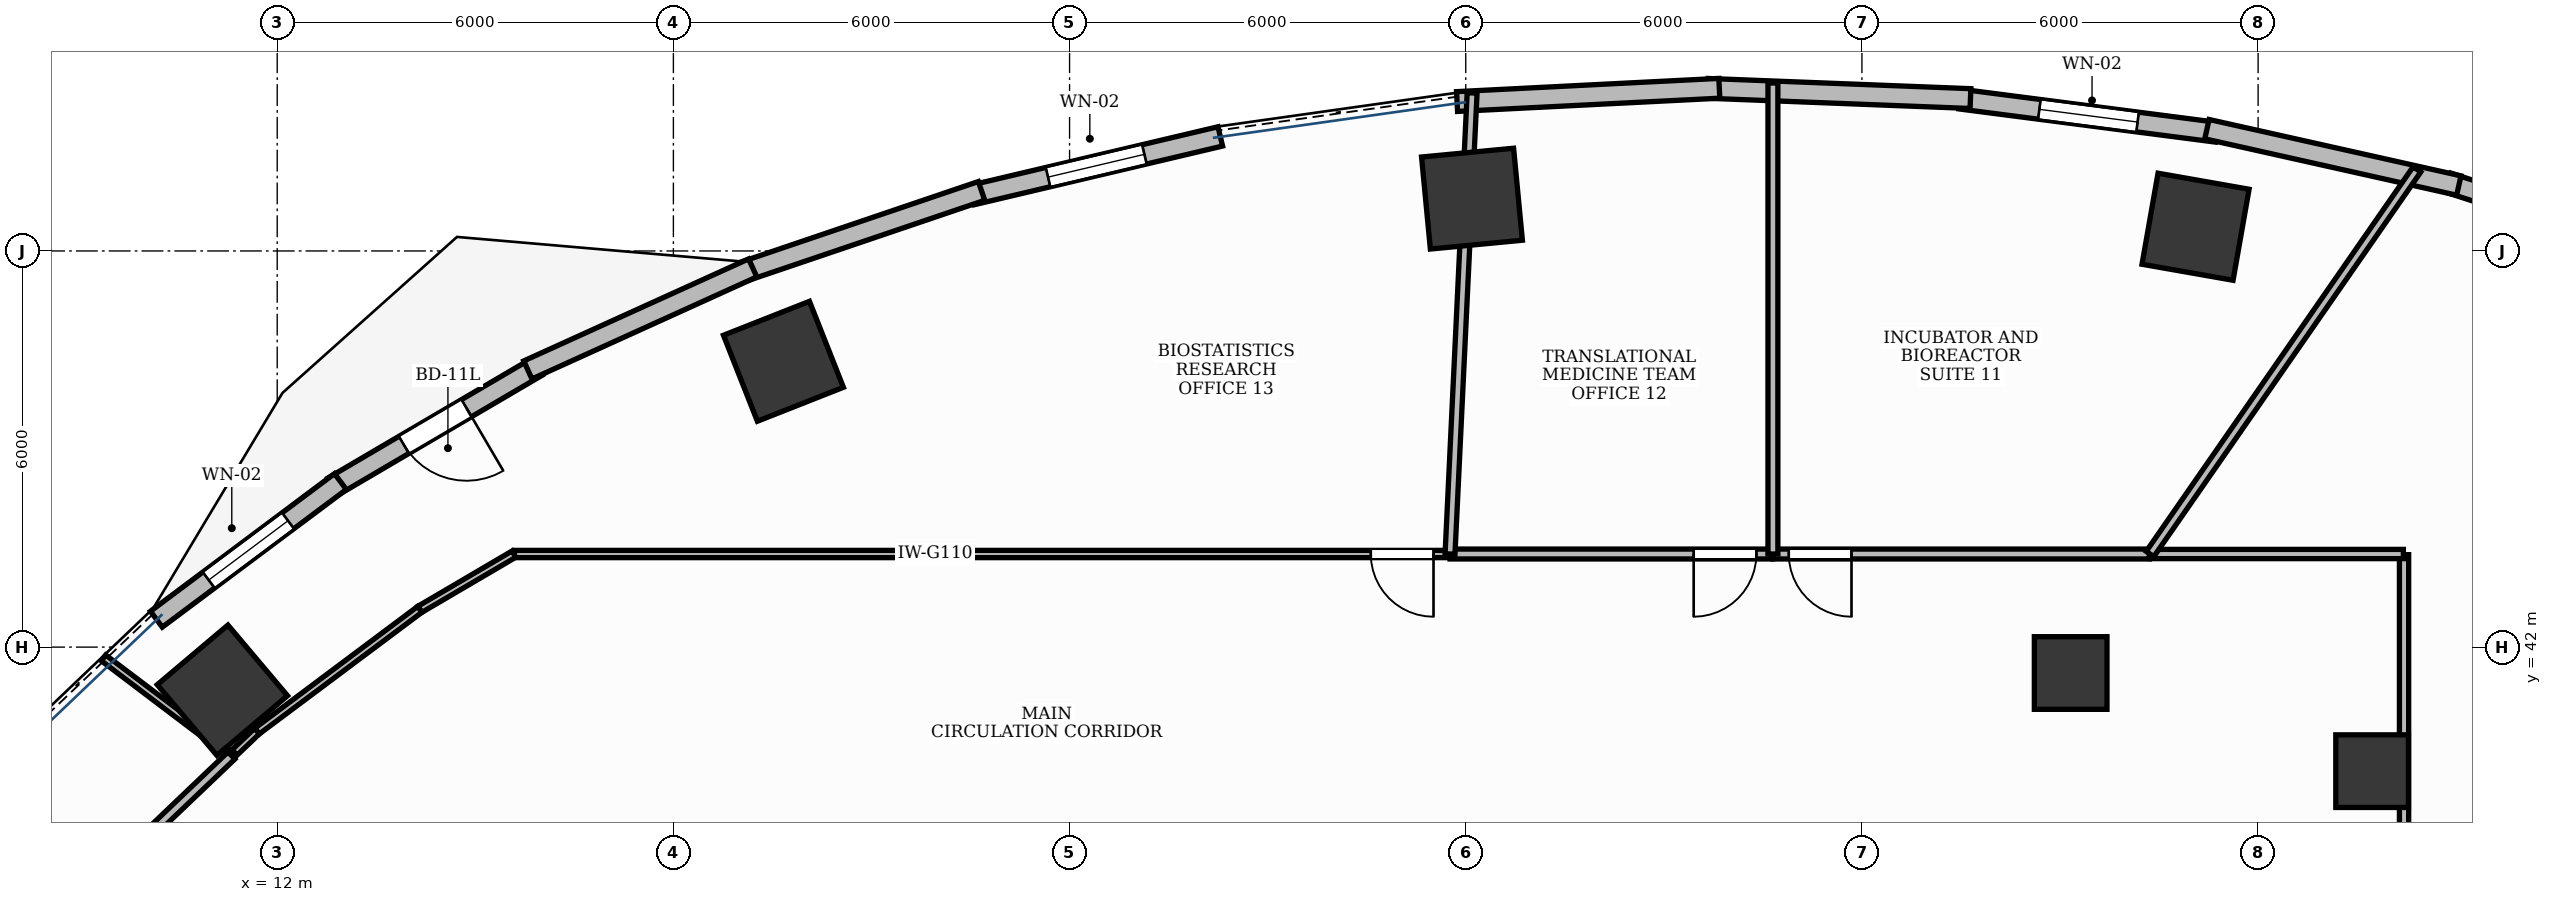
"""IFC4 building model, lengths in metres.
Left out: names, types, materials, properties, quantities, classifications, styles, units other than length and angle.
Written with IfcOpenShell. Run it as: python <this file> out.ifc"""

import sys

from ifc_helpers import new_model, si_unit, direction, frame, frame_2d, origin, origin_2d, place, context, subcontext, project, spatial, rectangle, extrude, element, fill, save


model = new_model("IFC4")
c1 = context("Model", 3, precision=1e-05, world=origin(), true_north=direction((0.0, 1.0)))
c2 = subcontext(c1, "Body", "Model", "MODEL_VIEW")
j1 = project(units=[si_unit("LENGTHUNIT", "METRE"), si_unit("PLANEANGLEUNIT", "RADIAN")], contexts=[c1])
p1 = place(None, origin())
s1 = spatial("IfcSite", under=j1, at=p1, CompositionType="ELEMENT")
p2 = place(p1, origin())
s2 = spatial("IfcBuilding", under=s1, at=p2, CompositionType="ELEMENT")
p3 = place(p2, frame((0.0, 0.0, 38.4)))
s3 = spatial("IfcBuildingStorey", under=s2, at=p3, CompositionType="ELEMENT", Elevation=38.4)
p4 = place(p3, frame((43.727, 40.121, -0.0), z_axis=(0.0, 0.0, 1.0), x_axis=(1.0, 0.0, 0.0)))
e1 = element("IfcColumn", 1, at=p4, inside=s3, PredefinedType="COLUMN", context=c2, shape_type="SweptSolid", body=[
    extrude(rectangle(XDim=1.1, YDim=1.1, at=origin_2d()), origin(), (0.0, 0.0, 1.0), 3.901),
])
p5 = place(p3, frame((41.052, 48.367, -0.0), z_axis=(0.0, 0.0, 1.0), x_axis=(-0.984868307662, 0.173304404339, 0.0)))
e2 = element("IfcColumn", 2, at=p5, inside=s3, PredefinedType="COLUMN", context=c2, shape_type="SweptSolid", body=[
    extrude(rectangle(XDim=1.4, YDim=1.4, at=origin_2d()), origin(), (0.0, 0.0, 1.0), 3.901),
])
p6 = place(p3, frame((39.161, 41.608, -0.0), z_axis=(0.0, 0.0, 1.0), x_axis=(1.0, 0.0, 0.0)))
e3 = element("IfcColumn", 3, at=p6, inside=s3, PredefinedType="COLUMN", context=c2, shape_type="SweptSolid", body=[
    extrude(rectangle(XDim=1.1, YDim=1.1, at=origin_2d()), origin(), (0.0, 0.0, 1.0), 3.901),
])
for number, where, z_axis, x_axis in (
    (4, (30.094, 48.792, -0.0), (0.0, 0.0, 1.0), (0.995, 0.095, 0.0)),
    (5, (19.667, 46.329, -0.0), (0.0, 0.0, 1.0), (0.93, 0.367, 0.0)),
    (6, (11.17, 41.347, -0.0), (0.0, 0.0, 1.0), (0.764, 0.645, 0.0)),
):
    element("IfcColumn", number, at=place(p3, frame(where, z_axis=z_axis, x_axis=x_axis)), inside=s3, PredefinedType="COLUMN", context=c2, shape_type="SweptSolid", body=[
        extrude(rectangle(XDim=1.4, YDim=1.4, at=origin_2d()), origin(), (0.0, 0.0, 1.0), 3.901),
    ])
p7 = place(p3, frame((41.373, 49.798, 0.0), z_axis=(0.0, 0.0, 1.0), x_axis=(-0.991741322416, 0.128254237408, 0.0)))
e7 = element("IfcWall", 7, at=p7, inside=s3, PredefinedType="STANDARD", context=c2, shape_type="SweptSolid", body=[
    extrude(rectangle(XDim=3.916, YDim=0.3, at=frame_2d((1.958, 0.0))), origin(), (0.0, 0.0, 1.0), 3.47),
])
p8 = place(p7, frame((1.208, 0.0, 0.95)))
e8 = element("IfcOpeningElement", 8, at=p8, cuts=e7, PredefinedType="OPENING", context=c2, shape_type="SweptSolid", body=[
    extrude(rectangle(XDim=1.5, YDim=1.8, at=frame_2d((0.75, 0.9))), frame((0.0, 0.165, 0.0), z_axis=(0.0, -1.0, 0.0), x_axis=(1.0, 0.0, 0.0)), (0.0, 0.0, 1.0), 0.33),
])
p9 = place(p3, frame((26.282, 49.735, 0.0), z_axis=(0.0, 0.0, 1.0), x_axis=(-0.973186156802, -0.230018921417, 0.0)))
e9 = element("IfcWall", 9, at=p9, inside=s3, PredefinedType="STANDARD", context=c2, shape_type="SweptSolid", body=[
    extrude(rectangle(XDim=3.861, YDim=0.3, at=frame_2d((1.931, 0.0))), origin(), (0.0, 0.0, 1.0), 3.9),
])
p10 = place(p9, frame((1.181, 0.0, 0.95)))
e10 = element("IfcOpeningElement", 10, at=p10, cuts=e9, PredefinedType="OPENING", context=c2, shape_type="SweptSolid", body=[
    extrude(rectangle(XDim=1.5, YDim=1.8, at=frame_2d((0.75, 0.9))), frame((0.0, 0.165, 0.0), z_axis=(0.0, -1.0, 0.0), x_axis=(1.0, 0.0, 0.0)), (0.0, 0.0, 1.0), 0.33),
])
p11 = place(p3, frame((15.944, 46.25, 0.0), z_axis=(0.0, 0.0, 1.0), x_axis=(-0.862473134325, -0.506102847817, 0.0)))
e11 = element("IfcWall", 11, at=p11, inside=s3, PredefinedType="STANDARD", context=c2, shape_type="SweptSolid", body=[
    extrude(rectangle(XDim=3.595, YDim=0.3, at=frame_2d((1.798, 0.0))), origin(), (0.0, 0.0, 1.0), 3.9),
])
p12 = place(p11, frame((1.248, 0.0, 0.0)))
e12 = element("IfcOpeningElement", 12, at=p12, cuts=e11, PredefinedType="OPENING", context=c2, shape_type="SweptSolid", body=[
    extrude(rectangle(XDim=1.1, YDim=2.15, at=frame_2d((0.55, 1.075))), frame((0.0, 0.165, 0.0), z_axis=(0.0, -1.0, 0.0), x_axis=(1.0, 0.0, 0.0)), (0.0, 0.0, 1.0), 0.33),
])
p13 = place(p3, frame((12.957, 44.507, 0.0), z_axis=(0.0, 0.0, 1.0), x_axis=(-0.800798896088, -0.59893332519, 0.0)))
e13 = element("IfcWall", 13, at=p13, inside=s3, PredefinedType="STANDARD", context=c2, shape_type="SweptSolid", body=[
    extrude(rectangle(XDim=3.481, YDim=0.3, at=frame_2d((1.74, 0.0))), origin(), (0.0, 0.0, 1.0), 3.9),
])
p14 = place(p13, frame((0.99, 0.0, 0.95)))
e14 = element("IfcOpeningElement", 14, at=p14, cuts=e13, PredefinedType="OPENING", context=c2, shape_type="SweptSolid", body=[
    extrude(rectangle(XDim=1.5, YDim=1.8, at=frame_2d((0.75, 0.9))), frame((0.0, 0.165, 0.0), z_axis=(0.0, -1.0, 0.0), x_axis=(1.0, 0.0, 0.0)), (0.0, 0.0, 1.0), 0.33),
])
p15 = place(p3, frame((48.525, 47.849, 0.0), z_axis=(0.0, 0.0, 1.0), x_axis=(-0.950965833732, 0.309295947393, 0.0)))
e15 = element("IfcWall", 15, at=p15, inside=s3, PredefinedType="STANDARD", context=c2, shape_type="SweptSolid", body=[
    extrude(rectangle(XDim=3.84, YDim=0.3, at=frame_2d((1.92, 0.0))), origin(), (0.0, 0.0, 1.0), 3.9),
])
p16 = place(p3, frame((45.04, 48.991, 0.0), z_axis=(0.0, 0.0, 1.0), x_axis=(-0.975868573345, 0.218358713032, 0.0)))
e16 = element("IfcWall", 16, at=p16, inside=s3, PredefinedType="STANDARD", context=c2, shape_type="SweptSolid", body=[
    extrude(rectangle(XDim=3.909, YDim=0.3, at=frame_2d((1.954, 0.0))), origin(), (0.0, 0.0, 1.0), 3.9),
])
p17 = place(p3, frame((37.644, 50.308, 0.0), z_axis=(0.0, 0.0, 1.0), x_axis=(-0.999245411623, 0.038840794937, 0.0)))
e17 = element("IfcWall", 17, at=p17, inside=s3, PredefinedType="STANDARD", context=c2, shape_type="SweptSolid", body=[
    extrude(rectangle(XDim=3.979, YDim=0.3, at=frame_2d((1.989, 0.0))), origin(), (0.0, 0.0, 1.0), 3.9),
])
p18 = place(p3, frame((33.84, 50.463, 0.0), z_axis=(0.0, 0.0, 1.0), x_axis=(-0.998732359232, -0.050335619826, 0.0)))
e18 = element("IfcWall", 18, at=p18, inside=s3, PredefinedType="STANDARD", context=c2, shape_type="SweptSolid", body=[
    extrude(rectangle(XDim=3.977, YDim=0.3, at=frame_2d((1.989, 0.0))), origin(), (0.0, 0.0, 1.0), 3.47),
])
p19 = place(p3, frame((22.667, 48.909, 0.0), z_axis=(0.0, 0.0, 1.0), x_axis=(-0.94702579403, -0.321157508773, 0.0)))
e19 = element("IfcWall", 19, at=p19, inside=s3, PredefinedType="STANDARD", context=c2, shape_type="SweptSolid", body=[
    extrude(rectangle(XDim=3.83, YDim=0.3, at=frame_2d((1.915, 0.0))), origin(), (0.0, 0.0, 1.0), 3.9),
])
p20 = place(p3, frame((19.201, 47.743, 0.0), z_axis=(0.0, 0.0, 1.0), x_axis=(-0.910623406862, -0.413237233166, 0.0)))
e20 = element("IfcWall", 20, at=p20, inside=s3, PredefinedType="STANDARD", context=c2, shape_type="SweptSolid", body=[
    extrude(rectangle(XDim=3.74, YDim=0.3, at=frame_2d((1.87, 0.0))), origin(), (0.0, 0.0, 1.0), 3.9),
])
p21 = place(p3, frame((44.21, 29.72, 0.0), z_axis=(0.0, 0.0, 1.0), x_axis=(0.0, 1.0, 0.0)))
e21 = element("IfcWall", 21, at=p21, inside=s3, PredefinedType="PARTITIONING", context=c2, shape_type="SweptSolid", body=[
    extrude(rectangle(XDim=13.68, YDim=0.14, at=frame_2d((6.84, 0.0))), origin(), (0.0, 0.0, 1.0), 2.91),
])
p22 = place(p21, frame((2.202, 0.0, 0.0)))
e22 = element("IfcOpeningElement", 22, at=p22, cuts=e21, PredefinedType="OPENING", context=c2, shape_type="SweptSolid", body=[
    extrude(rectangle(XDim=0.95, YDim=2.15, at=frame_2d((0.475, 1.075))), frame((0.0, 0.085, 0.0), z_axis=(0.0, -1.0, 0.0), x_axis=(1.0, 0.0, 0.0)), (0.0, 0.0, 1.0), 0.17),
])
p23 = place(p3, frame((40.353, 43.41, 0.0), z_axis=(0.0, 0.0, 1.0), x_axis=(-1.0, 0.0, 0.0)))
e23 = element("IfcWall", 23, at=p23, inside=s3, PredefinedType="PARTITIONING", context=c2, shape_type="SweptSolid", body=[
    extrude(rectangle(XDim=5.701, YDim=0.15, at=frame_2d((2.851, 0.0))), origin(), (0.0, 0.0, 1.0), 2.91),
])
p24 = place(p23, frame((4.511, 0.0, 0.0)))
e24 = element("IfcOpeningElement", 24, at=p24, cuts=e23, PredefinedType="OPENING", context=c2, shape_type="SweptSolid", body=[
    extrude(rectangle(XDim=0.95, YDim=2.15, at=frame_2d((0.475, 1.075))), frame((0.0, 0.09, 0.0), z_axis=(0.0, -1.0, 0.0), x_axis=(1.0, 0.0, 0.0)), (0.0, 0.0, 1.0), 0.18),
])
p25 = place(p3, frame((34.642, 43.41, 0.0), z_axis=(0.0, 0.0, 1.0), x_axis=(-1.0, 0.0, 0.0)))
e25 = element("IfcWall", 25, at=p25, inside=s3, PredefinedType="PARTITIONING", context=c2, shape_type="SweptSolid", body=[
    extrude(rectangle(XDim=4.88, YDim=0.15, at=frame_2d((2.44, 0.0))), origin(), (0.0, 0.0, 1.0), 2.91),
])
p26 = place(p25, frame((0.24, 0.0, 0.0)))
e26 = element("IfcOpeningElement", 26, at=p26, cuts=e25, PredefinedType="OPENING", context=c2, shape_type="SweptSolid", body=[
    extrude(rectangle(XDim=0.95, YDim=2.15, at=frame_2d((0.475, 1.075))), frame((0.0, 0.09, 0.0), z_axis=(0.0, -1.0, 0.0), x_axis=(1.0, 0.0, 0.0)), (0.0, 0.0, 1.0), 0.18),
])
p27 = place(p3, frame((29.752, 43.41, 0.0), z_axis=(0.0, 0.0, 1.0), x_axis=(-1.0, 0.0, 0.0)))
e27 = element("IfcWall", 27, at=p27, inside=s3, PredefinedType="MOVABLE", context=c2, shape_type="SweptSolid", body=[
    extrude(rectangle(XDim=14.161, YDim=0.11, at=frame_2d((7.081, 0.0))), origin(), (0.0, 0.0, 1.0), 2.91),
])
p28 = place(p27, frame((0.24, 0.0, 0.0)))
e28 = element("IfcOpeningElement", 28, at=p28, cuts=e27, PredefinedType="OPENING", context=c2, shape_type="SweptSolid", body=[
    extrude(rectangle(XDim=0.95, YDim=2.15, at=frame_2d((0.475, 1.075))), frame((0.0, 0.07, 0.0), z_axis=(0.0, -1.0, 0.0), x_axis=(1.0, 0.0, 0.0)), (0.0, 0.0, 1.0), 0.14),
])
p29 = place(p3, frame((44.2, 43.41, 0.0), z_axis=(0.0, 0.0, 1.0), x_axis=(-1.0, 0.0, 0.0)))
e29 = element("IfcWall", 29, at=p29, inside=s3, PredefinedType="PARTITIONING", context=c2, shape_type="SweptSolid", body=[
    extrude(rectangle(XDim=3.837, YDim=0.14, at=frame_2d((1.918, 0.0))), origin(), (0.0, 0.0, 1.0), 2.91),
])
p30 = place(p3, frame((40.363, 43.41, 0.0), z_axis=(0.0, 0.0, 1.0), x_axis=(0.570097674314, 0.821576923813, 0.0)))
e30 = element("IfcWall", 30, at=p30, inside=s3, PredefinedType="PARTITIONING", context=c2, shape_type="SweptSolid", body=[
    extrude(rectangle(XDim=7.091, YDim=0.14, at=frame_2d((3.545, 0.0))), origin(), (0.0, 0.0, 1.0), 2.91),
])
p31 = place(p3, frame((34.652, 43.41, 0.0), z_axis=(0.0, 0.0, 1.0), x_axis=(0.0, 1.0, 0.0)))
e31 = element("IfcWall", 31, at=p31, inside=s3, PredefinedType="PARTITIONING", context=c2, shape_type="SweptSolid", body=[
    extrude(rectangle(XDim=7.134, YDim=0.15, at=frame_2d((3.567, 0.0))), origin(), (0.0, 0.0, 1.0), 2.91),
])
p32 = place(p3, frame((29.762, 43.41, 0.0), z_axis=(0.0, 0.0, 1.0), x_axis=(0.047838889666, 0.99885506488, 0.0)))
e32 = element("IfcWall", 32, at=p32, inside=s3, PredefinedType="PARTITIONING", context=c2, shape_type="SweptSolid", body=[
    extrude(rectangle(XDim=6.992, YDim=0.15, at=frame_2d((3.496, 0.0))), origin(), (0.0, 0.0, 1.0), 2.91),
])
p33 = place(p3, frame((15.586, 43.409, 0.0), z_axis=(0.0, 0.0, 1.0), x_axis=(-0.862446636904, -0.506148000582, 0.0)))
e33 = element("IfcWall", 33, at=p33, inside=s3, PredefinedType="MOVABLE", context=c2, shape_type="SweptSolid", body=[
    extrude(rectangle(XDim=1.652, YDim=0.11, at=frame_2d((0.826, 0.0))), origin(), (0.0, 0.0, 1.0), 2.91),
])
p34 = place(p3, frame((14.16, 42.572, 0.0), z_axis=(0.0, 0.0, 1.0), x_axis=(-0.800808090092, -0.598921032227, 0.0)))
e34 = element("IfcWall", 34, at=p34, inside=s3, PredefinedType="MOVABLE", context=c2, shape_type="SweptSolid", body=[
    extrude(rectangle(XDim=3.079, YDim=0.11, at=frame_2d((1.54, 0.0))), origin(), (0.0, 0.0, 1.0), 2.91),
])
p35 = place(p3, frame((11.693, 40.727, 0.0), z_axis=(0.0, 0.0, 1.0), x_axis=(-0.72367263626, -0.690143402148, 0.0)))
e35 = element("IfcWall", 35, at=p35, inside=s3, PredefinedType="MOVABLE", context=c2, shape_type="SweptSolid", body=[
    extrude(rectangle(XDim=0.524, YDim=0.11, at=frame_2d((0.262, 0.0))), origin(), (0.0, 0.0, 1.0), 2.91),
])
p36 = place(p3, frame((11.314, 40.365, 0.0), z_axis=(0.0, 0.0, 1.0), x_axis=(-0.797445450475, 0.603391045274, 0.0)))
e36 = element("IfcWall", 36, at=p36, inside=s3, PredefinedType="MOVABLE", context=c2, shape_type="SweptSolid", body=[
    extrude(rectangle(XDim=2.438, YDim=0.11, at=frame_2d((1.219, 0.0))), origin(), (0.0, 0.0, 1.0), 2.91),
])
p37 = place(p3, frame((11.307, 40.358, 0.0), z_axis=(0.0, 0.0, 1.0), x_axis=(-0.723655021688, -0.690161872017, 0.0)))
e37 = element("IfcWall", 37, at=p37, inside=s3, PredefinedType="PARTITIONING", context=c2, shape_type="SweptSolid", body=[
    extrude(rectangle(XDim=2.406, YDim=0.15, at=frame_2d((1.203, 0.0))), origin(), (0.0, 0.0, 1.0), 2.91),
])
p38 = place(p8, origin())
e38 = element("IfcWindow", 38, at=p38, inside=s3, PartitioningType="DOUBLE_PANEL_VERTICAL", PredefinedType="WINDOW", context=c2, shape_type="SweptSolid", body=[
    extrude(rectangle(XDim=1.5, YDim=1.8, at=frame_2d((0.75, 0.9))), frame((0.0, 0.03, 0.0), z_axis=(0.0, -1.0, 0.0), x_axis=(1.0, 0.0, 0.0)), (0.0, 0.0, 1.0), 0.06),
])
fill(e8, e38)
p39 = place(p10, origin())
e39 = element("IfcWindow", 39, at=p39, inside=s3, PartitioningType="DOUBLE_PANEL_VERTICAL", PredefinedType="WINDOW", context=c2, shape_type="SweptSolid", body=[
    extrude(rectangle(XDim=1.5, YDim=1.8, at=frame_2d((0.75, 0.9))), frame((0.0, 0.03, 0.0), z_axis=(0.0, -1.0, 0.0), x_axis=(1.0, 0.0, 0.0)), (0.0, 0.0, 1.0), 0.06),
])
fill(e10, e39)
p40 = place(p12, origin())
e40 = element("IfcDoor", 40, at=p40, inside=s3, OperationType="SINGLE_SWING_LEFT", PredefinedType="DOOR", context=c2, shape_type="SweptSolid", body=[
    extrude(rectangle(XDim=1.1, YDim=2.15, at=frame_2d((0.55, 1.075))), frame((0.0, 0.025, 0.0), z_axis=(0.0, -1.0, 0.0), x_axis=(1.0, 0.0, 0.0)), (0.0, 0.0, 1.0), 0.05),
])
fill(e12, e40)
p41 = place(p14, origin())
e41 = element("IfcWindow", 41, at=p41, inside=s3, PartitioningType="DOUBLE_PANEL_VERTICAL", PredefinedType="WINDOW", context=c2, shape_type="SweptSolid", body=[
    extrude(rectangle(XDim=1.5, YDim=1.8, at=frame_2d((0.75, 0.9))), frame((0.0, 0.03, 0.0), z_axis=(0.0, -1.0, 0.0), x_axis=(1.0, 0.0, 0.0)), (0.0, 0.0, 1.0), 0.06),
])
fill(e14, e41)
p42 = place(p24, origin())
e42 = element("IfcDoor", 42, at=p42, inside=s3, OperationType="SINGLE_SWING_LEFT", PredefinedType="DOOR", context=c2, shape_type="SweptSolid", body=[
    extrude(rectangle(XDim=0.95, YDim=2.15, at=frame_2d((0.475, 1.075))), frame((0.0, 0.025, 0.0), z_axis=(0.0, -1.0, 0.0), x_axis=(1.0, 0.0, 0.0)), (0.0, 0.0, 1.0), 0.05),
])
fill(e24, e42)
p43 = place(p26, origin())
e43 = element("IfcDoor", 43, at=p43, inside=s3, OperationType="SINGLE_SWING_RIGHT", PredefinedType="DOOR", context=c2, shape_type="SweptSolid", body=[
    extrude(rectangle(XDim=0.95, YDim=2.15, at=frame_2d((0.475, 1.075))), frame((0.0, 0.025, 0.0), z_axis=(0.0, -1.0, 0.0), x_axis=(1.0, 0.0, 0.0)), (0.0, 0.0, 1.0), 0.05),
])
fill(e26, e43)
p44 = place(p28, origin())
e44 = element("IfcDoor", 44, at=p44, inside=s3, OperationType="SINGLE_SWING_LEFT", PredefinedType="DOOR", context=c2, shape_type="SweptSolid", body=[
    extrude(rectangle(XDim=0.95, YDim=2.15, at=frame_2d((0.475, 1.075))), frame((0.0, 0.025, 0.0), z_axis=(0.0, -1.0, 0.0), x_axis=(1.0, 0.0, 0.0)), (0.0, 0.0, 1.0), 0.05),
])
fill(e28, e44)
save(model, sys.argv[1])
